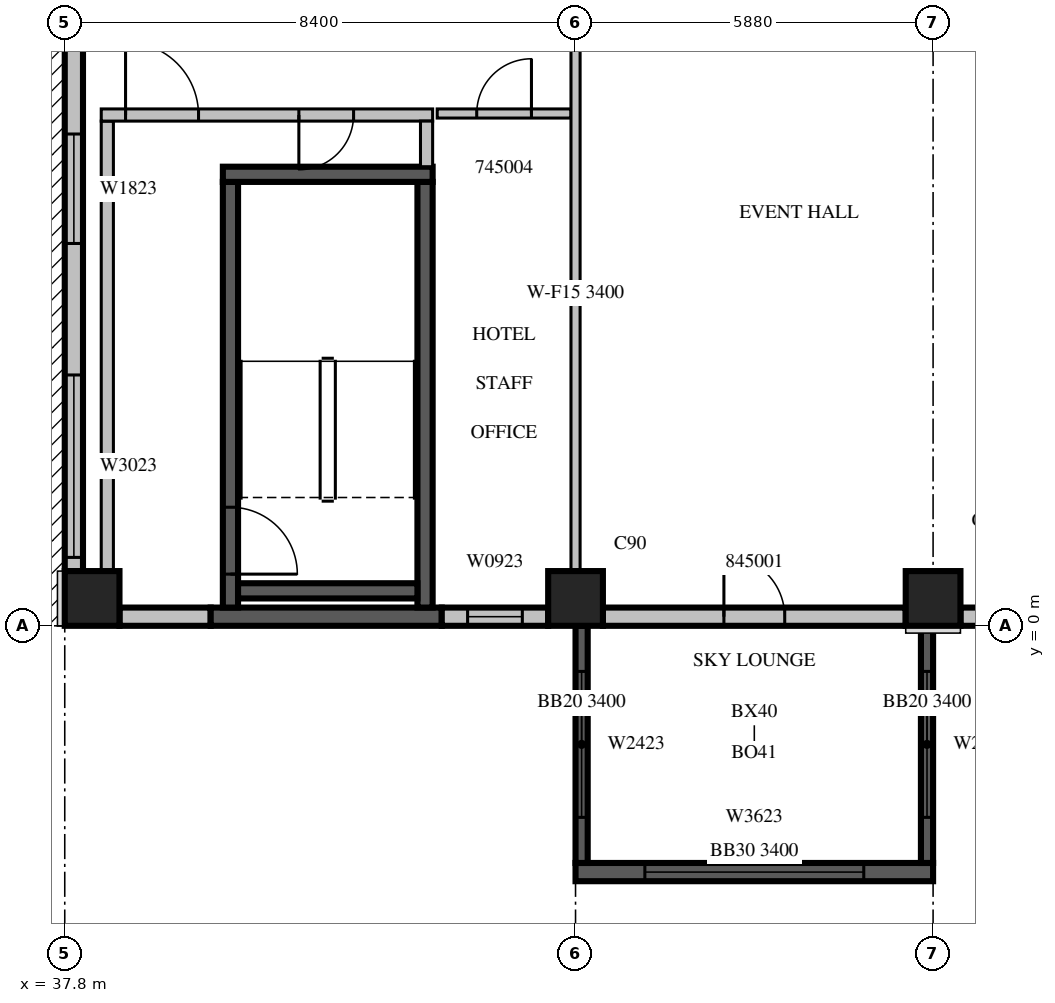
"""IFC4 building model, lengths in metres.
Left out: names, types, materials, properties, quantities, classifications, styles, units other than length and angle.
Written with IfcOpenShell. Run it as: python <this file> out.ifc"""

import sys

from ifc_helpers import new_model, si_unit, direction, frame, frame_2d, origin, origin_2d, place, context, subcontext, project, spatial, rectangle, extrude, source, transform, mapped, element, fill, save


model = new_model("IFC4")
c1 = context("Model", 3, precision=1e-05, world=origin(), true_north=direction((0.0, 1.0)))
c2 = subcontext(c1, "Body", "Model", "MODEL_VIEW")
j1 = project(units=[si_unit("LENGTHUNIT", "METRE"), si_unit("PLANEANGLEUNIT", "RADIAN")], contexts=[c1])
p1 = place(None, origin())
s1 = spatial("IfcSite", under=j1, at=p1, CompositionType="ELEMENT")
p2 = place(p1, origin())
s2 = spatial("IfcBuilding", under=s1, at=p2, CompositionType="ELEMENT")
p3 = place(p2, frame((0.0, 0.0, 204.4)))
s3 = spatial("IfcBuildingStorey", under=s2, at=p3, CompositionType="ELEMENT", Elevation=204.4)
m1 = source(origin(), c2, "Body", "SweptSolid", [
    extrude(rectangle(XDim=0.9, YDim=0.9, at=origin_2d()), origin(), (0.0, 0.0, 1.0), 3.8),
])
for number, where, z_axis, x_axis in (
    (1, (38.25, 0.45, 0.0), (0.0, 0.0, 1.0), (1.0, 0.0, 0.0)),
    (2, (46.2, 0.45, 0.0), (0.0, 0.0, 1.0), (1.0, 0.0, 0.0)),
    (3, (52.08, 0.45, 0.0), (0.0, 0.0, 1.0), (1.0, 0.0, 0.0)),
):
    element("IfcColumn", number, at=place(p3, frame(where, z_axis=z_axis, x_axis=x_axis)), inside=s3, PredefinedType="COLUMN", context=c2, shape_type="MappedRepresentation", body=[
        mapped(m1, transform((0.0, 0.0, 0.0), scale=1.0)),
    ])
m2 = source(origin(), c2, "Body", "SweptSolid", [
    extrude(rectangle(XDim=5.88, YDim=0.3, at=frame_2d((2.94, 0.0))), origin(), (0.0, 0.0, 1.0), 3.4),
])
p4 = place(p3, frame((46.2, -4.05, 0.0), z_axis=(0.0, 0.0, 1.0), x_axis=(1.0, 0.0, 0.0)))
e4 = element("IfcWall", 4, at=p4, inside=s3, PredefinedType="SOLIDWALL", context=c2, shape_type="MappedRepresentation", body=[
    mapped(m2, transform((0.0, 0.0, 0.0), scale=1.0)),
])
m3 = source(origin(), c2, "Body", "SweptSolid", [
    extrude(rectangle(XDim=3.6, YDim=2.3, at=frame_2d((1.8, 1.15))), frame((0.0, 0.16, 0.0), z_axis=(0.0, -1.0, 0.0), x_axis=(1.0, 0.0, 0.0)), (0.0, 0.0, 1.0), 0.32),
])
p5 = place(p4, frame((1.14, 0.0, 0.6)))
e5 = element("IfcOpeningElement", 5, at=p5, cuts=e4, PredefinedType="OPENING", context=c2, shape_type="MappedRepresentation", body=[
    mapped(m3, transform((0.0, 0.0, 0.0), scale=1.0)),
])
m4 = source(origin(), c2, "Body", "SweptSolid", [
    extrude(rectangle(XDim=3.9, YDim=0.2, at=frame_2d((1.95, 0.0))), origin(), (0.0, 0.0, 1.0), 3.4),
])
p6 = place(p3, frame((46.3, 0.0, 0.0), z_axis=(0.0, 0.0, 1.0), x_axis=(0.0, -1.0, 0.0)))
e6 = element("IfcWall", 6, at=p6, inside=s3, PredefinedType="SOLIDWALL", context=c2, shape_type="MappedRepresentation", body=[
    mapped(m4, transform((0.0, 0.0, 0.0), scale=1.0)),
])
m5 = source(origin(), c2, "Body", "SweptSolid", [
    extrude(rectangle(XDim=2.4, YDim=2.3, at=frame_2d((1.2, 1.15))), frame((0.0, 0.11, 0.0), z_axis=(0.0, -1.0, 0.0), x_axis=(1.0, 0.0, 0.0)), (0.0, 0.0, 1.0), 0.22),
])
p7 = place(p6, frame((0.75, 0.0, 0.6)))
e7 = element("IfcOpeningElement", 7, at=p7, cuts=e6, PredefinedType="OPENING", context=c2, shape_type="MappedRepresentation", body=[
    mapped(m5, transform((0.0, 0.0, 0.0), scale=1.0)),
])
p8 = place(p3, frame((51.98, 0.0, 0.0), z_axis=(0.0, 0.0, 1.0), x_axis=(0.0, -1.0, 0.0)))
e8 = element("IfcWall", 8, at=p8, inside=s3, PredefinedType="SOLIDWALL", context=c2, shape_type="MappedRepresentation", body=[
    mapped(m4, transform((0.0, 0.0, 0.0), scale=1.0)),
])
p9 = place(p8, frame((0.75, 0.0, 0.6)))
e9 = element("IfcOpeningElement", 9, at=p9, cuts=e8, PredefinedType="OPENING", context=c2, shape_type="MappedRepresentation", body=[
    mapped(m5, transform((0.0, 0.0, 0.0), scale=1.0)),
])
m6 = source(origin(), c2, "Body", "SweptSolid", [
    extrude(rectangle(XDim=9.15, YDim=0.3, at=frame_2d((4.575, 0.0))), origin(), (0.0, 0.0, 1.0), 3.4),
])
p10 = place(p3, frame((37.95, 10.05, 0.0), z_axis=(0.0, 0.0, 1.0), x_axis=(0.0, -1.0, 0.0)))
e10 = element("IfcWall", 10, at=p10, inside=s3, PredefinedType="STANDARD", context=c2, shape_type="MappedRepresentation", body=[
    mapped(m6, transform((0.0, 0.0, 0.0), scale=1.0)),
])
m7 = source(origin(), c2, "Body", "SweptSolid", [
    extrude(rectangle(XDim=1.8, YDim=2.3, at=frame_2d((0.9, 1.15))), frame((0.0, 0.16, 0.0), z_axis=(0.0, -1.0, 0.0), x_axis=(1.0, 0.0, 0.0)), (0.0, 0.0, 1.0), 0.32),
])
p11 = place(p10, frame((1.962, 0.0, 0.6)))
e11 = element("IfcOpeningElement", 11, at=p11, cuts=e10, PredefinedType="OPENING", context=c2, shape_type="MappedRepresentation", body=[
    mapped(m7, transform((0.0, 0.0, 0.0), scale=1.0)),
])
m8 = source(origin(), c2, "Body", "SweptSolid", [
    extrude(rectangle(XDim=3.0, YDim=2.3, at=frame_2d((1.5, 1.15))), frame((0.0, 0.16, 0.0), z_axis=(0.0, -1.0, 0.0), x_axis=(1.0, 0.0, 0.0)), (0.0, 0.0, 1.0), 0.32),
])
p12 = place(p10, frame((5.925, 0.0, 0.6)))
e12 = element("IfcOpeningElement", 12, at=p12, cuts=e10, PredefinedType="OPENING", context=c2, shape_type="MappedRepresentation", body=[
    mapped(m8, transform((0.0, 0.0, 0.0), scale=1.0)),
])
p13 = place(p3, frame((38.7, 0.15, 0.0), z_axis=(0.0, 0.0, 1.0), x_axis=(1.0, 0.0, 0.0)))
e13 = element("IfcWall", 13, at=p13, inside=s3, PredefinedType="STANDARD", context=c2, shape_type="SweptSolid", body=[
    extrude(rectangle(XDim=1.5, YDim=0.3, at=frame_2d((0.75, 0.0))), origin(), (0.0, 0.0, 1.0), 3.4),
])
m9 = source(origin(), c2, "Body", "SweptSolid", [
    extrude(rectangle(XDim=3.8, YDim=0.3, at=frame_2d((1.9, 0.0))), origin(), (0.0, 0.0, 1.0), 3.4),
])
p14 = place(p3, frame((40.2, 0.15, 0.0), z_axis=(0.0, 0.0, 1.0), x_axis=(1.0, 0.0, 0.0)))
e14 = element("IfcWall", 14, at=p14, inside=s3, PredefinedType="SOLIDWALL", context=c2, shape_type="MappedRepresentation", body=[
    mapped(m9, transform((0.0, 0.0, 0.0), scale=1.0)),
])
m10 = source(origin(), c2, "Body", "SweptSolid", [
    extrude(rectangle(XDim=1.75, YDim=0.3, at=frame_2d((0.875, 0.0))), origin(), (0.0, 0.0, 1.0), 3.4),
])
p15 = place(p3, frame((44.0, 0.15, 0.0), z_axis=(0.0, 0.0, 1.0), x_axis=(1.0, 0.0, 0.0)))
e15 = element("IfcWall", 15, at=p15, inside=s3, PredefinedType="STANDARD", context=c2, shape_type="MappedRepresentation", body=[
    mapped(m10, transform((0.0, 0.0, 0.0), scale=1.0)),
])
m11 = source(origin(), c2, "Body", "SweptSolid", [
    extrude(rectangle(XDim=0.9, YDim=2.3, at=frame_2d((0.45, 1.15))), frame((0.0, 0.16, 0.0), z_axis=(0.0, -1.0, 0.0), x_axis=(1.0, 0.0, 0.0)), (0.0, 0.0, 1.0), 0.32),
])
p16 = place(p15, frame((0.425, 0.0, 0.6)))
e16 = element("IfcOpeningElement", 16, at=p16, cuts=e15, PredefinedType="OPENING", context=c2, shape_type="MappedRepresentation", body=[
    mapped(m11, transform((0.0, 0.0, 0.0), scale=1.0)),
])
m12 = source(origin(), c2, "Body", "SweptSolid", [
    extrude(rectangle(XDim=4.98, YDim=0.3, at=frame_2d((2.49, 0.0))), origin(), (0.0, 0.0, 1.0), 3.4),
])
p17 = place(p3, frame((46.65, 0.15, 0.0), z_axis=(0.0, 0.0, 1.0), x_axis=(1.0, 0.0, 0.0)))
e17 = element("IfcWall", 17, at=p17, inside=s3, PredefinedType="STANDARD", context=c2, shape_type="MappedRepresentation", body=[
    mapped(m12, transform((0.0, 0.0, 0.0), scale=1.0)),
])
m13 = source(origin(), c2, "Body", "SweptSolid", [
    extrude(rectangle(XDim=1.0, YDim=2.1, at=frame_2d((0.5, 1.05))), frame((0.0, 0.16, 0.0), z_axis=(0.0, -1.0, 0.0), x_axis=(1.0, 0.0, 0.0)), (0.0, 0.0, 1.0), 0.32),
])
p18 = place(p17, frame((1.99, 0.0, 0.0)))
e18 = element("IfcOpeningElement", 18, at=p18, cuts=e17, PredefinedType="OPENING", context=c2, shape_type="MappedRepresentation", body=[
    mapped(m13, transform((0.0, 0.0, 0.0), scale=1.0)),
])
m14 = source(origin(), c2, "Body", "SweptSolid", [
    extrude(rectangle(XDim=2.91, YDim=0.3, at=frame_2d((1.455, 0.0))), origin(), (0.0, 0.0, 1.0), 3.4),
])
p19 = place(p3, frame((52.53, 0.15, 0.0), z_axis=(0.0, 0.0, 1.0), x_axis=(1.0, 0.0, 0.0)))
e19 = element("IfcWall", 19, at=p19, inside=s3, PredefinedType="STANDARD", context=c2, shape_type="MappedRepresentation", body=[
    mapped(m14, transform((0.0, 0.0, 0.0), scale=1.0)),
])
p20 = place(p19, frame((0.33, 0.0, 0.6)))
e20 = element("IfcOpeningElement", 20, at=p20, cuts=e19, PredefinedType="OPENING", context=c2, shape_type="MappedRepresentation", body=[
    mapped(m7, transform((0.0, 0.0, 0.0), scale=1.0)),
])
m15 = source(origin(), c2, "Body", "SweptSolid", [
    extrude(rectangle(XDim=7.0, YDim=0.25, at=frame_2d((3.5, 0.0))), origin(), (0.0, 0.0, 1.0), 3.4),
])
p21 = place(p3, frame((40.525, 0.3, 0.0), z_axis=(0.0, 0.0, 1.0), x_axis=(0.0, 1.0, 0.0)))
e21 = element("IfcWall", 21, at=p21, inside=s3, PredefinedType="SOLIDWALL", context=c2, shape_type="MappedRepresentation", body=[
    mapped(m15, transform((0.0, 0.0, 0.0), scale=1.0)),
])
m16 = source(origin(), c2, "Body", "SweptSolid", [
    extrude(rectangle(XDim=1.1, YDim=2.1, at=frame_2d((0.55, 1.05))), frame((0.0, 0.135, 0.0), z_axis=(0.0, -1.0, 0.0), x_axis=(1.0, 0.0, 0.0)), (0.0, 0.0, 1.0), 0.27),
])
p22 = place(p21, frame((0.55, 0.0, 0.0)))
e22 = element("IfcOpeningElement", 22, at=p22, cuts=e21, PredefinedType="OPENING", context=c2, shape_type="MappedRepresentation", body=[
    mapped(m16, transform((0.0, 0.0, 0.0), scale=1.0)),
])
p23 = place(p3, frame((43.725, 0.3, 0.0), z_axis=(0.0, 0.0, 1.0), x_axis=(0.0, 1.0, 0.0)))
e23 = element("IfcWall", 23, at=p23, inside=s3, PredefinedType="SOLIDWALL", context=c2, shape_type="MappedRepresentation", body=[
    mapped(m15, transform((0.0, 0.0, 0.0), scale=1.0)),
])
m17 = source(origin(), c2, "Body", "SweptSolid", [
    extrude(rectangle(XDim=3.45, YDim=0.25, at=frame_2d((1.725, 0.0))), origin(), (0.0, 0.0, 1.0), 3.4),
])
p24 = place(p3, frame((40.4, 7.425, 0.0), z_axis=(0.0, 0.0, 1.0), x_axis=(1.0, 0.0, 0.0)))
e24 = element("IfcWall", 24, at=p24, inside=s3, PredefinedType="SOLIDWALL", context=c2, shape_type="MappedRepresentation", body=[
    mapped(m17, transform((0.0, 0.0, 0.0), scale=1.0)),
])
m18 = source(origin(), c2, "Body", "SweptSolid", [
    extrude(rectangle(XDim=2.95, YDim=0.25, at=frame_2d((1.475, 0.0))), origin(), (0.0, 0.0, 1.0), 3.4),
])
p25 = place(p3, frame((40.65, 0.575, 0.0), z_axis=(0.0, 0.0, 1.0), x_axis=(1.0, 0.0, 0.0)))
e25 = element("IfcWall", 25, at=p25, inside=s3, PredefinedType="SOLIDWALL", context=c2, shape_type="MappedRepresentation", body=[
    mapped(m18, transform((0.0, 0.0, 0.0), scale=1.0)),
])
m19 = source(origin(), c2, "Body", "SweptSolid", [
    extrude(rectangle(XDim=8.0, YDim=0.2, at=frame_2d((4.0, 0.0))), origin(), (0.0, 0.0, 1.0), 3.4),
])
p26 = place(p3, frame((38.5, 0.3, 0.0), z_axis=(0.0, 0.0, 1.0), x_axis=(0.0, 1.0, 0.0)))
e26 = element("IfcWall", 26, at=p26, inside=s3, PredefinedType="PARTITIONING", context=c2, shape_type="MappedRepresentation", body=[
    mapped(m19, transform((0.0, 0.0, 0.0), scale=1.0)),
])
m20 = source(origin(), c2, "Body", "SweptSolid", [
    extrude(rectangle(XDim=5.45, YDim=0.2, at=frame_2d((2.725, 0.0))), origin(), (0.0, 0.0, 1.0), 3.4),
])
p27 = place(p3, frame((38.4, 8.4, 0.0), z_axis=(0.0, 0.0, 1.0), x_axis=(1.0, 0.0, 0.0)))
e27 = element("IfcWall", 27, at=p27, inside=s3, PredefinedType="PARTITIONING", context=c2, shape_type="MappedRepresentation", body=[
    mapped(m20, transform((0.0, 0.0, 0.0), scale=1.0)),
])
m21 = source(origin(), c2, "Body", "SweptSolid", [
    extrude(rectangle(XDim=1.2, YDim=2.1, at=frame_2d((0.6, 1.05))), frame((0.0, 0.11, 0.0), z_axis=(0.0, -1.0, 0.0), x_axis=(1.0, 0.0, 0.0)), (0.0, 0.0, 1.0), 0.22),
])
p28 = place(p27, frame((0.4, 0.0, 0.0)))
e28 = element("IfcOpeningElement", 28, at=p28, cuts=e27, PredefinedType="OPENING", context=c2, shape_type="MappedRepresentation", body=[
    mapped(m21, transform((0.0, 0.0, 0.0), scale=1.0)),
])
m22 = source(origin(), c2, "Body", "SweptSolid", [
    extrude(rectangle(XDim=0.9, YDim=2.1, at=frame_2d((0.45, 1.05))), frame((0.0, 0.11, 0.0), z_axis=(0.0, -1.0, 0.0), x_axis=(1.0, 0.0, 0.0)), (0.0, 0.0, 1.0), 0.22),
])
p29 = place(p27, frame((3.25, 0.0, 0.0)))
e29 = element("IfcOpeningElement", 29, at=p29, cuts=e27, PredefinedType="OPENING", context=c2, shape_type="MappedRepresentation", body=[
    mapped(m22, transform((0.0, 0.0, 0.0), scale=1.0)),
])
m23 = source(origin(), c2, "Body", "SweptSolid", [
    extrude(rectangle(XDim=0.75, YDim=0.2, at=frame_2d((0.375, 0.0))), origin(), (0.0, 0.0, 1.0), 3.4),
])
p30 = place(p3, frame((43.75, 7.55, 0.0), z_axis=(0.0, 0.0, 1.0), x_axis=(0.0, 1.0, 0.0)))
e30 = element("IfcWall", 30, at=p30, inside=s3, PredefinedType="PARTITIONING", context=c2, shape_type="MappedRepresentation", body=[
    mapped(m23, transform((0.0, 0.0, 0.0), scale=1.0)),
])
m24 = source(origin(), c2, "Body", "SweptSolid", [
    extrude(rectangle(XDim=2.2, YDim=0.15, at=frame_2d((1.1, 0.0))), origin(), (0.0, 0.0, 1.0), 3.4),
])
p31 = place(p3, frame((46.125, 8.425, 0.0), z_axis=(0.0, 0.0, 1.0), x_axis=(-1.0, 0.0, 0.0)))
e31 = element("IfcWall", 31, at=p31, inside=s3, PredefinedType="PARTITIONING", context=c2, shape_type="MappedRepresentation", body=[
    mapped(m24, transform((0.0, 0.0, 0.0), scale=1.0)),
])
m25 = source(origin(), c2, "Body", "SweptSolid", [
    extrude(rectangle(XDim=0.9, YDim=2.1, at=frame_2d((0.45, 1.05))), frame((0.0, 0.085, 0.0), z_axis=(0.0, -1.0, 0.0), x_axis=(1.0, 0.0, 0.0)), (0.0, 0.0, 1.0), 0.17),
])
p32 = place(p31, frame((0.65, 0.0, 0.0)))
e32 = element("IfcOpeningElement", 32, at=p32, cuts=e31, PredefinedType="OPENING", context=c2, shape_type="MappedRepresentation", body=[
    mapped(m25, transform((0.0, 0.0, 0.0), scale=1.0)),
])
m26 = source(origin(), c2, "Body", "SweptSolid", [
    extrude(rectangle(XDim=9.152, YDim=0.15, at=frame_2d((4.576, 0.0))), origin(), (0.0, 0.0, 1.0), 3.4),
])
p33 = place(p3, frame((46.2, 0.899, 0.0), z_axis=(0.0, 0.0, 1.0), x_axis=(0.0, 1.0, 0.0)))
e33 = element("IfcWall", 33, at=p33, inside=s3, PredefinedType="PARTITIONING", context=c2, shape_type="MappedRepresentation", body=[
    mapped(m26, transform((0.0, 0.0, 0.0), scale=1.0)),
])
m27 = source(origin(), c2, "Body", "SweptSolid", [
    extrude(rectangle(XDim=3.6, YDim=2.3, at=frame_2d((1.8, 1.15))), frame((0.0, 0.03, 0.0), z_axis=(0.0, -1.0, 0.0), x_axis=(1.0, 0.0, 0.0)), (0.0, 0.0, 1.0), 0.06),
])
p34 = place(p5, origin())
e34 = element("IfcWindow", 34, at=p34, inside=s3, PartitioningType="SINGLE_PANEL", PredefinedType="WINDOW", context=c2, shape_type="MappedRepresentation", body=[
    mapped(m27, transform((0.0, 0.0, 0.0), scale=1.0)),
])
fill(e5, e34)
m28 = source(origin(), c2, "Body", "SweptSolid", [
    extrude(rectangle(XDim=2.4, YDim=2.3, at=frame_2d((1.2, 1.15))), frame((0.0, 0.03, 0.0), z_axis=(0.0, -1.0, 0.0), x_axis=(1.0, 0.0, 0.0)), (0.0, 0.0, 1.0), 0.06),
])
p35 = place(p7, origin())
e35 = element("IfcWindow", 35, at=p35, inside=s3, PartitioningType="SINGLE_PANEL", PredefinedType="WINDOW", context=c2, shape_type="MappedRepresentation", body=[
    mapped(m28, transform((0.0, 0.0, 0.0), scale=1.0)),
])
fill(e7, e35)
p36 = place(p9, origin())
e36 = element("IfcWindow", 36, at=p36, inside=s3, PartitioningType="SINGLE_PANEL", PredefinedType="WINDOW", context=c2, shape_type="MappedRepresentation", body=[
    mapped(m28, transform((0.0, 0.0, 0.0), scale=1.0)),
])
fill(e9, e36)
m29 = source(origin(), c2, "Body", "SweptSolid", [
    extrude(rectangle(XDim=1.8, YDim=2.3, at=frame_2d((0.9, 1.15))), frame((0.0, 0.03, 0.0), z_axis=(0.0, -1.0, 0.0), x_axis=(1.0, 0.0, 0.0)), (0.0, 0.0, 1.0), 0.06),
])
p37 = place(p11, origin())
e37 = element("IfcWindow", 37, at=p37, inside=s3, PartitioningType="SINGLE_PANEL", PredefinedType="WINDOW", context=c2, shape_type="MappedRepresentation", body=[
    mapped(m29, transform((0.0, 0.0, 0.0), scale=1.0)),
])
fill(e11, e37)
m30 = source(origin(), c2, "Body", "SweptSolid", [
    extrude(rectangle(XDim=3.0, YDim=2.3, at=frame_2d((1.5, 1.15))), frame((0.0, 0.03, 0.0), z_axis=(0.0, -1.0, 0.0), x_axis=(1.0, 0.0, 0.0)), (0.0, 0.0, 1.0), 0.06),
])
p38 = place(p12, origin())
e38 = element("IfcWindow", 38, at=p38, inside=s3, PartitioningType="SINGLE_PANEL", PredefinedType="WINDOW", context=c2, shape_type="MappedRepresentation", body=[
    mapped(m30, transform((0.0, 0.0, 0.0), scale=1.0)),
])
fill(e12, e38)
m31 = source(origin(), c2, "Body", "SweptSolid", [
    extrude(rectangle(XDim=0.9, YDim=2.3, at=frame_2d((0.45, 1.15))), frame((0.0, 0.03, 0.0), z_axis=(0.0, -1.0, 0.0), x_axis=(1.0, 0.0, 0.0)), (0.0, 0.0, 1.0), 0.06),
])
p39 = place(p16, origin())
e39 = element("IfcWindow", 39, at=p39, inside=s3, PartitioningType="SINGLE_PANEL", PredefinedType="WINDOW", context=c2, shape_type="MappedRepresentation", body=[
    mapped(m31, transform((0.0, 0.0, 0.0), scale=1.0)),
])
fill(e16, e39)
m32 = source(origin(), c2, "Body", "SweptSolid", [
    extrude(rectangle(XDim=1.1, YDim=2.1, at=frame_2d((0.55, 1.05))), frame((0.0, 0.025, 0.0), z_axis=(0.0, -1.0, 0.0), x_axis=(1.0, 0.0, 0.0)), (0.0, 0.0, 1.0), 0.05),
])
p40 = place(p22, origin())
e40 = element("IfcDoor", 40, at=p40, inside=s3, OperationType="SINGLE_SWING_RIGHT", PredefinedType="DOOR", context=c2, shape_type="MappedRepresentation", body=[
    mapped(m32, transform((0.0, 0.0, 0.0), scale=1.0)),
])
fill(e22, e40)
m33 = source(origin(), c2, "Body", "SweptSolid", [
    extrude(rectangle(XDim=1.2, YDim=2.1, at=frame_2d((0.6, 1.05))), frame((0.0, 0.025, 0.0), z_axis=(0.0, -1.0, 0.0), x_axis=(1.0, 0.0, 0.0)), (0.0, 0.0, 1.0), 0.05),
])
p41 = place(p28, origin())
e41 = element("IfcDoor", 41, at=p41, inside=s3, OperationType="SINGLE_SWING_LEFT", PredefinedType="DOOR", context=c2, shape_type="MappedRepresentation", body=[
    mapped(m33, transform((0.0, 0.0, 0.0), scale=1.0)),
])
fill(e28, e41)
m34 = source(origin(), c2, "Body", "SweptSolid", [
    extrude(rectangle(XDim=0.9, YDim=2.1, at=frame_2d((0.45, 1.05))), frame((0.0, 0.025, 0.0), z_axis=(0.0, -1.0, 0.0), x_axis=(1.0, 0.0, 0.0)), (0.0, 0.0, 1.0), 0.05),
])
p42 = place(p29, origin())
e42 = element("IfcDoor", 42, at=p42, inside=s3, OperationType="SINGLE_SWING_RIGHT", PredefinedType="DOOR", context=c2, shape_type="MappedRepresentation", body=[
    mapped(m34, transform((0.0, 0.0, 0.0), scale=1.0)),
])
fill(e29, e42)
p43 = place(p32, origin())
e43 = element("IfcDoor", 43, at=p43, inside=s3, OperationType="SINGLE_SWING_RIGHT", PredefinedType="DOOR", context=c2, shape_type="MappedRepresentation", body=[
    mapped(m34, transform((0.0, 0.0, 0.0), scale=1.0)),
])
fill(e32, e43)
m35 = source(origin(), c2, "Body", "SweptSolid", [
    extrude(rectangle(XDim=1.0, YDim=2.1, at=frame_2d((0.5, 1.05))), frame((0.0, 0.025, 0.0), z_axis=(0.0, -1.0, 0.0), x_axis=(1.0, 0.0, 0.0)), (0.0, 0.0, 1.0), 0.05),
])
p44 = place(p18, origin())
e44 = element("IfcDoor", 44, at=p44, inside=s3, OperationType="SINGLE_SWING_LEFT", PredefinedType="DOOR", context=c2, shape_type="MappedRepresentation", body=[
    mapped(m35, transform((0.0, 0.0, 0.0), scale=1.0)),
])
fill(e18, e44)
save(model, sys.argv[1])
